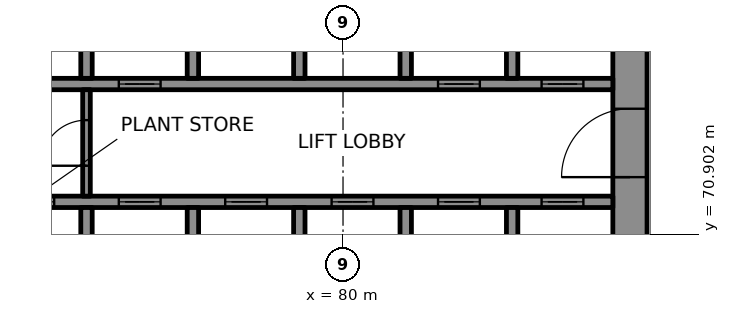
"""IFC4 building model, lengths in metres.
Left out: names, types, materials, properties, quantities, classifications, styles, units other than length and angle.
Written with IfcOpenShell. Run it as: python <this file> out.ifc"""

import sys

from ifc_helpers import new_model, si_unit, direction, frame, frame_2d, origin, place, context, subcontext, project, spatial, rectangle, extrude, element, fill, save


model = new_model("IFC4")
c1 = context("Model", 3, precision=1e-05, world=origin(), true_north=direction((0.0, 1.0)))
c2 = subcontext(c1, "Body", "Model", "MODEL_VIEW")
j1 = project(units=[si_unit("LENGTHUNIT", "METRE"), si_unit("PLANEANGLEUNIT", "RADIAN")], contexts=[c1])
p1 = place(None, origin())
s1 = spatial("IfcSite", under=j1, at=p1, CompositionType="ELEMENT")
p2 = place(p1, origin())
s2 = spatial("IfcBuilding", under=s1, at=p2, CompositionType="ELEMENT")
p3 = place(p2, frame((0.0, 0.0, 31.0)))
s3 = spatial("IfcBuildingStorey", under=s2, at=p3, CompositionType="ELEMENT", Elevation=31.0)
p4 = place(p3, frame((87.55, 66.9, 0.0), z_axis=(0.0, 0.0, 1.0), x_axis=(0.0, 1.0, 0.0)))
e1 = element("IfcWall", 1, at=p4, inside=s3, PredefinedType="SHEAR", context=c2, shape_type="SweptSolid", body=[
    extrude(rectangle(XDim=16.2, YDim=0.9, at=frame_2d((8.1, 0.0))), origin(), (0.0, 0.0, 1.0), 4.05),
])
p5 = place(p4, frame((5.5, 0.0, 0.0)))
e2 = element("IfcOpeningElement", 2, at=p5, cuts=e1, PredefinedType="OPENING", context=c2, shape_type="SweptSolid", body=[
    extrude(rectangle(XDim=1.8, YDim=2.1, at=frame_2d((0.9, 1.05))), frame((0.0, 0.46, 0.0), z_axis=(0.0, -1.0, 0.0), x_axis=(1.0, 0.0, 0.0)), (0.0, 0.0, 1.0), 0.92),
])
p6 = place(p4, frame((11.202, 0.0, 0.0)))
e3 = element("IfcOpeningElement", 3, at=p6, cuts=e1, PredefinedType="OPENING", context=c2, shape_type="SweptSolid", body=[
    extrude(rectangle(XDim=0.9, YDim=2.1, at=frame_2d((0.45, 1.05))), frame((0.0, 0.46, 0.0), z_axis=(0.0, -1.0, 0.0), x_axis=(1.0, 0.0, 0.0)), (0.0, 0.0, 1.0), 0.92),
])
p7 = place(p3, frame((70.3, 71.75, 0.0), z_axis=(0.0, 0.0, 1.0), x_axis=(1.0, 0.0, 0.0)))
e4 = element("IfcWall", 4, at=p7, inside=s3, PredefinedType="SHEAR", context=c2, shape_type="SweptSolid", body=[
    extrude(rectangle(XDim=16.8, YDim=0.3, at=frame_2d((8.4, 0.0))), origin(), (0.0, 0.0, 1.0), 4.05),
])
p8 = place(p7, frame((1.0, 0.0, 0.0)))
e5 = element("IfcOpeningElement", 5, at=p8, cuts=e4, PredefinedType="OPENING", context=c2, shape_type="SweptSolid", body=[
    extrude(rectangle(XDim=1.1, YDim=2.1, at=frame_2d((0.55, 1.05))), frame((0.0, 0.16, 0.0), z_axis=(0.0, -1.0, 0.0), x_axis=(1.0, 0.0, 0.0)), (0.0, 0.0, 1.0), 0.32),
])
p9 = place(p7, frame((3.8, 0.0, 0.0)))
e6 = element("IfcOpeningElement", 6, at=p9, cuts=e4, PredefinedType="OPENING", context=c2, shape_type="SweptSolid", body=[
    extrude(rectangle(XDim=1.1, YDim=2.1, at=frame_2d((0.55, 1.05))), frame((0.0, 0.16, 0.0), z_axis=(0.0, -1.0, 0.0), x_axis=(1.0, 0.0, 0.0)), (0.0, 0.0, 1.0), 0.32),
])
p10 = place(p7, frame((6.6, 0.0, 0.0)))
e7 = element("IfcOpeningElement", 7, at=p10, cuts=e4, PredefinedType="OPENING", context=c2, shape_type="SweptSolid", body=[
    extrude(rectangle(XDim=1.1, YDim=2.1, at=frame_2d((0.55, 1.05))), frame((0.0, 0.16, 0.0), z_axis=(0.0, -1.0, 0.0), x_axis=(1.0, 0.0, 0.0)), (0.0, 0.0, 1.0), 0.32),
])
p11 = place(p7, frame((9.4, 0.0, 0.0)))
e8 = element("IfcOpeningElement", 8, at=p11, cuts=e4, PredefinedType="OPENING", context=c2, shape_type="SweptSolid", body=[
    extrude(rectangle(XDim=1.1, YDim=2.1, at=frame_2d((0.55, 1.05))), frame((0.0, 0.16, 0.0), z_axis=(0.0, -1.0, 0.0), x_axis=(1.0, 0.0, 0.0)), (0.0, 0.0, 1.0), 0.32),
])
p12 = place(p7, frame((12.2, 0.0, 0.0)))
e9 = element("IfcOpeningElement", 9, at=p12, cuts=e4, PredefinedType="OPENING", context=c2, shape_type="SweptSolid", body=[
    extrude(rectangle(XDim=1.1, YDim=2.1, at=frame_2d((0.55, 1.05))), frame((0.0, 0.16, 0.0), z_axis=(0.0, -1.0, 0.0), x_axis=(1.0, 0.0, 0.0)), (0.0, 0.0, 1.0), 0.32),
])
p13 = place(p7, frame((14.925, 0.0, 0.0)))
e10 = element("IfcOpeningElement", 10, at=p13, cuts=e4, PredefinedType="OPENING", context=c2, shape_type="SweptSolid", body=[
    extrude(rectangle(XDim=1.1, YDim=2.1, at=frame_2d((0.55, 1.05))), frame((0.0, 0.16, 0.0), z_axis=(0.0, -1.0, 0.0), x_axis=(1.0, 0.0, 0.0)), (0.0, 0.0, 1.0), 0.32),
])
p14 = place(p3, frame((70.3, 74.85, 0.0), z_axis=(0.0, 0.0, 1.0), x_axis=(1.0, 0.0, 0.0)))
e11 = element("IfcWall", 11, at=p14, inside=s3, PredefinedType="SHEAR", context=c2, shape_type="SweptSolid", body=[
    extrude(rectangle(XDim=16.8, YDim=0.3, at=frame_2d((8.4, 0.0))), origin(), (0.0, 0.0, 1.0), 4.05),
])
p15 = place(p14, frame((3.8, 0.0, 0.0)))
e12 = element("IfcOpeningElement", 12, at=p15, cuts=e11, PredefinedType="OPENING", context=c2, shape_type="SweptSolid", body=[
    extrude(rectangle(XDim=1.1, YDim=2.1, at=frame_2d((0.55, 1.05))), frame((0.0, 0.16, 0.0), z_axis=(0.0, -1.0, 0.0), x_axis=(1.0, 0.0, 0.0)), (0.0, 0.0, 1.0), 0.32),
])
p16 = place(p14, frame((12.2, 0.0, 0.0)))
e13 = element("IfcOpeningElement", 13, at=p16, cuts=e11, PredefinedType="OPENING", context=c2, shape_type="SweptSolid", body=[
    extrude(rectangle(XDim=1.1, YDim=2.1, at=frame_2d((0.55, 1.05))), frame((0.0, 0.16, 0.0), z_axis=(0.0, -1.0, 0.0), x_axis=(1.0, 0.0, 0.0)), (0.0, 0.0, 1.0), 0.32),
])
p17 = place(p14, frame((14.925, 0.0, 0.0)))
e14 = element("IfcOpeningElement", 14, at=p17, cuts=e11, PredefinedType="OPENING", context=c2, shape_type="SweptSolid", body=[
    extrude(rectangle(XDim=1.1, YDim=2.1, at=frame_2d((0.55, 1.05))), frame((0.0, 0.16, 0.0), z_axis=(0.0, -1.0, 0.0), x_axis=(1.0, 0.0, 0.0)), (0.0, 0.0, 1.0), 0.32),
])
for number, where, z_axis, x_axis in (
    (15, (73.25, 69.0, 0.0), (0.0, 0.0, 1.0), (0.0, 1.0, 0.0)),
    (16, (73.25, 75.0, 0.0), (0.0, 0.0, 1.0), (0.0, 1.0, 0.0)),
    (17, (76.05, 69.0, 0.0), (0.0, 0.0, 1.0), (0.0, 1.0, 0.0)),
    (18, (76.05, 75.0, 0.0), (0.0, 0.0, 1.0), (0.0, 1.0, 0.0)),
    (19, (78.85, 69.0, 0.0), (0.0, 0.0, 1.0), (0.0, 1.0, 0.0)),
    (20, (78.85, 75.0, 0.0), (0.0, 0.0, 1.0), (0.0, 1.0, 0.0)),
    (21, (81.65, 69.0, 0.0), (0.0, 0.0, 1.0), (0.0, 1.0, 0.0)),
    (22, (81.65, 75.0, 0.0), (0.0, 0.0, 1.0), (0.0, 1.0, 0.0)),
    (23, (84.45, 69.0, 0.0), (0.0, 0.0, 1.0), (0.0, 1.0, 0.0)),
    (24, (84.45, 75.0, 0.0), (0.0, 0.0, 1.0), (0.0, 1.0, 0.0)),
):
    element("IfcWall", number, at=place(p3, frame(where, z_axis=z_axis, x_axis=x_axis)), inside=s3, PredefinedType="SHEAR", context=c2, shape_type="SweptSolid", body=[
        extrude(rectangle(XDim=2.6, YDim=0.3, at=frame_2d((1.3, 0.0))), origin(), (0.0, 0.0, 1.0), 4.05),
    ])
p18 = place(p3, frame((107.504, 60.451, 0.0), z_axis=(0.0, 0.0, 1.0), x_axis=(-0.500000550228, 0.86602508611, 0.0)))
e25 = element("IfcWall", 25, at=p18, inside=s3, PredefinedType="SOLIDWALL", context=c2, shape_type="SweptSolid", body=[
    extrude(rectangle(XDim=57.704, YDim=0.3, at=frame_2d((28.852, 0.0))), origin(), (0.0, 0.0, 1.0), 4.05),
])
p19 = place(p18, frame((0.89, 0.0, 0.8)))
e26 = element("IfcOpeningElement", 26, at=p19, cuts=e25, PredefinedType="OPENING", context=c2, shape_type="SweptSolid", body=[
    extrude(rectangle(XDim=3.0, YDim=2.4, at=frame_2d((1.5, 1.2))), frame((0.0, 0.16, 0.0), z_axis=(0.0, -1.0, 0.0), x_axis=(1.0, 0.0, 0.0)), (0.0, 0.0, 1.0), 0.32),
])
p20 = place(p18, frame((4.67, 0.0, 0.8)))
e27 = element("IfcOpeningElement", 27, at=p20, cuts=e25, PredefinedType="OPENING", context=c2, shape_type="SweptSolid", body=[
    extrude(rectangle(XDim=3.0, YDim=2.4, at=frame_2d((1.5, 1.2))), frame((0.0, 0.16, 0.0), z_axis=(0.0, -1.0, 0.0), x_axis=(1.0, 0.0, 0.0)), (0.0, 0.0, 1.0), 0.32),
])
p21 = place(p18, frame((8.451, 0.0, 0.8)))
e28 = element("IfcOpeningElement", 28, at=p21, cuts=e25, PredefinedType="OPENING", context=c2, shape_type="SweptSolid", body=[
    extrude(rectangle(XDim=3.0, YDim=2.4, at=frame_2d((1.5, 1.2))), frame((0.0, 0.16, 0.0), z_axis=(0.0, -1.0, 0.0), x_axis=(1.0, 0.0, 0.0)), (0.0, 0.0, 1.0), 0.32),
])
p22 = place(p18, frame((12.231, 0.0, 0.8)))
e29 = element("IfcOpeningElement", 29, at=p22, cuts=e25, PredefinedType="OPENING", context=c2, shape_type="SweptSolid", body=[
    extrude(rectangle(XDim=3.0, YDim=2.4, at=frame_2d((1.5, 1.2))), frame((0.0, 0.16, 0.0), z_axis=(0.0, -1.0, 0.0), x_axis=(1.0, 0.0, 0.0)), (0.0, 0.0, 1.0), 0.32),
])
p23 = place(p18, frame((16.011, 0.0, 0.8)))
e30 = element("IfcOpeningElement", 30, at=p23, cuts=e25, PredefinedType="OPENING", context=c2, shape_type="SweptSolid", body=[
    extrude(rectangle(XDim=3.0, YDim=2.4, at=frame_2d((1.5, 1.2))), frame((0.0, 0.16, 0.0), z_axis=(0.0, -1.0, 0.0), x_axis=(1.0, 0.0, 0.0)), (0.0, 0.0, 1.0), 0.32),
])
p24 = place(p18, frame((19.792, 0.0, 0.8)))
e31 = element("IfcOpeningElement", 31, at=p24, cuts=e25, PredefinedType="OPENING", context=c2, shape_type="SweptSolid", body=[
    extrude(rectangle(XDim=3.0, YDim=2.4, at=frame_2d((1.5, 1.2))), frame((0.0, 0.16, 0.0), z_axis=(0.0, -1.0, 0.0), x_axis=(1.0, 0.0, 0.0)), (0.0, 0.0, 1.0), 0.32),
])
p25 = place(p18, frame((23.572, 0.0, 0.8)))
e32 = element("IfcOpeningElement", 32, at=p25, cuts=e25, PredefinedType="OPENING", context=c2, shape_type="SweptSolid", body=[
    extrude(rectangle(XDim=3.0, YDim=2.4, at=frame_2d((1.5, 1.2))), frame((0.0, 0.16, 0.0), z_axis=(0.0, -1.0, 0.0), x_axis=(1.0, 0.0, 0.0)), (0.0, 0.0, 1.0), 0.32),
])
p26 = place(p18, frame((27.352, 0.0, 0.8)))
e33 = element("IfcOpeningElement", 33, at=p26, cuts=e25, PredefinedType="OPENING", context=c2, shape_type="SweptSolid", body=[
    extrude(rectangle(XDim=3.0, YDim=2.4, at=frame_2d((1.5, 1.2))), frame((0.0, 0.16, 0.0), z_axis=(0.0, -1.0, 0.0), x_axis=(1.0, 0.0, 0.0)), (0.0, 0.0, 1.0), 0.32),
])
p27 = place(p18, frame((31.132, 0.0, 0.8)))
e34 = element("IfcOpeningElement", 34, at=p27, cuts=e25, PredefinedType="OPENING", context=c2, shape_type="SweptSolid", body=[
    extrude(rectangle(XDim=3.0, YDim=2.4, at=frame_2d((1.5, 1.2))), frame((0.0, 0.16, 0.0), z_axis=(0.0, -1.0, 0.0), x_axis=(1.0, 0.0, 0.0)), (0.0, 0.0, 1.0), 0.32),
])
p28 = place(p18, frame((34.913, 0.0, 0.8)))
e35 = element("IfcOpeningElement", 35, at=p28, cuts=e25, PredefinedType="OPENING", context=c2, shape_type="SweptSolid", body=[
    extrude(rectangle(XDim=3.0, YDim=2.4, at=frame_2d((1.5, 1.2))), frame((0.0, 0.16, 0.0), z_axis=(0.0, -1.0, 0.0), x_axis=(1.0, 0.0, 0.0)), (0.0, 0.0, 1.0), 0.32),
])
p29 = place(p18, frame((38.693, 0.0, 0.8)))
e36 = element("IfcOpeningElement", 36, at=p29, cuts=e25, PredefinedType="OPENING", context=c2, shape_type="SweptSolid", body=[
    extrude(rectangle(XDim=3.0, YDim=2.4, at=frame_2d((1.5, 1.2))), frame((0.0, 0.16, 0.0), z_axis=(0.0, -1.0, 0.0), x_axis=(1.0, 0.0, 0.0)), (0.0, 0.0, 1.0), 0.32),
])
p30 = place(p18, frame((42.473, 0.0, 0.8)))
e37 = element("IfcOpeningElement", 37, at=p30, cuts=e25, PredefinedType="OPENING", context=c2, shape_type="SweptSolid", body=[
    extrude(rectangle(XDim=3.0, YDim=2.4, at=frame_2d((1.5, 1.2))), frame((0.0, 0.16, 0.0), z_axis=(0.0, -1.0, 0.0), x_axis=(1.0, 0.0, 0.0)), (0.0, 0.0, 1.0), 0.32),
])
p31 = place(p18, frame((46.253, 0.0, 0.8)))
e38 = element("IfcOpeningElement", 38, at=p31, cuts=e25, PredefinedType="OPENING", context=c2, shape_type="SweptSolid", body=[
    extrude(rectangle(XDim=3.0, YDim=2.4, at=frame_2d((1.5, 1.2))), frame((0.0, 0.16, 0.0), z_axis=(0.0, -1.0, 0.0), x_axis=(1.0, 0.0, 0.0)), (0.0, 0.0, 1.0), 0.32),
])
p32 = place(p18, frame((50.033, 0.0, 0.8)))
e39 = element("IfcOpeningElement", 39, at=p32, cuts=e25, PredefinedType="OPENING", context=c2, shape_type="SweptSolid", body=[
    extrude(rectangle(XDim=3.0, YDim=2.4, at=frame_2d((1.5, 1.2))), frame((0.0, 0.16, 0.0), z_axis=(0.0, -1.0, 0.0), x_axis=(1.0, 0.0, 0.0)), (0.0, 0.0, 1.0), 0.32),
])
p33 = place(p18, frame((53.814, 0.0, 0.8)))
e40 = element("IfcOpeningElement", 40, at=p33, cuts=e25, PredefinedType="OPENING", context=c2, shape_type="SweptSolid", body=[
    extrude(rectangle(XDim=3.0, YDim=2.4, at=frame_2d((1.5, 1.2))), frame((0.0, 0.16, 0.0), z_axis=(0.0, -1.0, 0.0), x_axis=(1.0, 0.0, 0.0)), (0.0, 0.0, 1.0), 0.32),
])
p34 = place(p3, frame((73.25, 71.9, 0.0), z_axis=(0.0, 0.0, 1.0), x_axis=(0.0, 1.0, 0.0)))
e41 = element("IfcWall", 41, at=p34, inside=s3, PredefinedType="PARTITIONING", context=c2, shape_type="SweptSolid", body=[
    extrude(rectangle(XDim=2.8, YDim=0.2, at=frame_2d((1.4, 0.0))), origin(), (0.0, 0.0, 1.0), 4.05),
])
p35 = place(p34, frame((0.8, 0.0, 0.0)))
e42 = element("IfcOpeningElement", 42, at=p35, cuts=e41, PredefinedType="OPENING", context=c2, shape_type="SweptSolid", body=[
    extrude(rectangle(XDim=1.2, YDim=2.1, at=frame_2d((0.6, 1.05))), frame((0.0, 0.11, 0.0), z_axis=(0.0, -1.0, 0.0), x_axis=(1.0, 0.0, 0.0)), (0.0, 0.0, 1.0), 0.22),
])
p36 = place(p8, origin())
e43 = element("IfcDoor", 43, at=p36, inside=s3, OperationType="DOUBLE_DOOR_SLIDING", PredefinedType="DOOR", context=c2, shape_type="SweptSolid", body=[
    extrude(rectangle(XDim=1.1, YDim=2.1, at=frame_2d((0.55, 1.05))), frame((0.0, 0.025, 0.0), z_axis=(0.0, -1.0, 0.0), x_axis=(1.0, 0.0, 0.0)), (0.0, 0.0, 1.0), 0.05),
])
fill(e5, e43)
p37 = place(p9, origin())
e44 = element("IfcDoor", 44, at=p37, inside=s3, OperationType="DOUBLE_DOOR_SLIDING", PredefinedType="DOOR", context=c2, shape_type="SweptSolid", body=[
    extrude(rectangle(XDim=1.1, YDim=2.1, at=frame_2d((0.55, 1.05))), frame((0.0, 0.025, 0.0), z_axis=(0.0, -1.0, 0.0), x_axis=(1.0, 0.0, 0.0)), (0.0, 0.0, 1.0), 0.05),
])
fill(e6, e44)
p38 = place(p10, origin())
e45 = element("IfcDoor", 45, at=p38, inside=s3, OperationType="DOUBLE_DOOR_SLIDING", PredefinedType="DOOR", context=c2, shape_type="SweptSolid", body=[
    extrude(rectangle(XDim=1.1, YDim=2.1, at=frame_2d((0.55, 1.05))), frame((0.0, 0.025, 0.0), z_axis=(0.0, -1.0, 0.0), x_axis=(1.0, 0.0, 0.0)), (0.0, 0.0, 1.0), 0.05),
])
fill(e7, e45)
p39 = place(p11, origin())
e46 = element("IfcDoor", 46, at=p39, inside=s3, OperationType="DOUBLE_DOOR_SLIDING", PredefinedType="DOOR", context=c2, shape_type="SweptSolid", body=[
    extrude(rectangle(XDim=1.1, YDim=2.1, at=frame_2d((0.55, 1.05))), frame((0.0, 0.025, 0.0), z_axis=(0.0, -1.0, 0.0), x_axis=(1.0, 0.0, 0.0)), (0.0, 0.0, 1.0), 0.05),
])
fill(e8, e46)
p40 = place(p12, origin())
e47 = element("IfcDoor", 47, at=p40, inside=s3, OperationType="DOUBLE_DOOR_SLIDING", PredefinedType="DOOR", context=c2, shape_type="SweptSolid", body=[
    extrude(rectangle(XDim=1.1, YDim=2.1, at=frame_2d((0.55, 1.05))), frame((0.0, 0.025, 0.0), z_axis=(0.0, -1.0, 0.0), x_axis=(1.0, 0.0, 0.0)), (0.0, 0.0, 1.0), 0.05),
])
fill(e9, e47)
p41 = place(p13, origin())
e48 = element("IfcDoor", 48, at=p41, inside=s3, OperationType="DOUBLE_DOOR_SLIDING", PredefinedType="DOOR", context=c2, shape_type="SweptSolid", body=[
    extrude(rectangle(XDim=1.1, YDim=2.1, at=frame_2d((0.55, 1.05))), frame((0.0, 0.025, 0.0), z_axis=(0.0, -1.0, 0.0), x_axis=(1.0, 0.0, 0.0)), (0.0, 0.0, 1.0), 0.05),
])
fill(e10, e48)
p42 = place(p15, origin())
e49 = element("IfcDoor", 49, at=p42, inside=s3, OperationType="DOUBLE_DOOR_SLIDING", PredefinedType="DOOR", context=c2, shape_type="SweptSolid", body=[
    extrude(rectangle(XDim=1.1, YDim=2.1, at=frame_2d((0.55, 1.05))), frame((0.0, 0.025, 0.0), z_axis=(0.0, -1.0, 0.0), x_axis=(1.0, 0.0, 0.0)), (0.0, 0.0, 1.0), 0.05),
])
fill(e12, e49)
p43 = place(p16, origin())
e50 = element("IfcDoor", 50, at=p43, inside=s3, OperationType="DOUBLE_DOOR_SLIDING", PredefinedType="DOOR", context=c2, shape_type="SweptSolid", body=[
    extrude(rectangle(XDim=1.1, YDim=2.1, at=frame_2d((0.55, 1.05))), frame((0.0, 0.025, 0.0), z_axis=(0.0, -1.0, 0.0), x_axis=(1.0, 0.0, 0.0)), (0.0, 0.0, 1.0), 0.05),
])
fill(e13, e50)
p44 = place(p17, origin())
e51 = element("IfcDoor", 51, at=p44, inside=s3, OperationType="DOUBLE_DOOR_SLIDING", PredefinedType="DOOR", context=c2, shape_type="SweptSolid", body=[
    extrude(rectangle(XDim=1.1, YDim=2.1, at=frame_2d((0.55, 1.05))), frame((0.0, 0.025, 0.0), z_axis=(0.0, -1.0, 0.0), x_axis=(1.0, 0.0, 0.0)), (0.0, 0.0, 1.0), 0.05),
])
fill(e14, e51)
p45 = place(p35, origin())
e52 = element("IfcDoor", 52, at=p45, inside=s3, OperationType="SINGLE_SWING_LEFT", PredefinedType="DOOR", context=c2, shape_type="SweptSolid", body=[
    extrude(rectangle(XDim=1.2, YDim=2.1, at=frame_2d((0.6, 1.05))), frame((0.0, 0.025, 0.0), z_axis=(0.0, -1.0, 0.0), x_axis=(1.0, 0.0, 0.0)), (0.0, 0.0, 1.0), 0.05),
])
fill(e42, e52)
p46 = place(p5, origin())
e53 = element("IfcDoor", 53, at=p46, inside=s3, OperationType="SINGLE_SWING_RIGHT", PredefinedType="DOOR", context=c2, shape_type="SweptSolid", body=[
    extrude(rectangle(XDim=1.8, YDim=2.1, at=frame_2d((0.9, 1.05))), frame((0.0, 0.17, 0.0), z_axis=(0.0, -1.0, 0.0), x_axis=(1.0, 0.0, 0.0)), (0.0, 0.0, 1.0), 0.34),
])
fill(e2, e53)
save(model, sys.argv[1])
